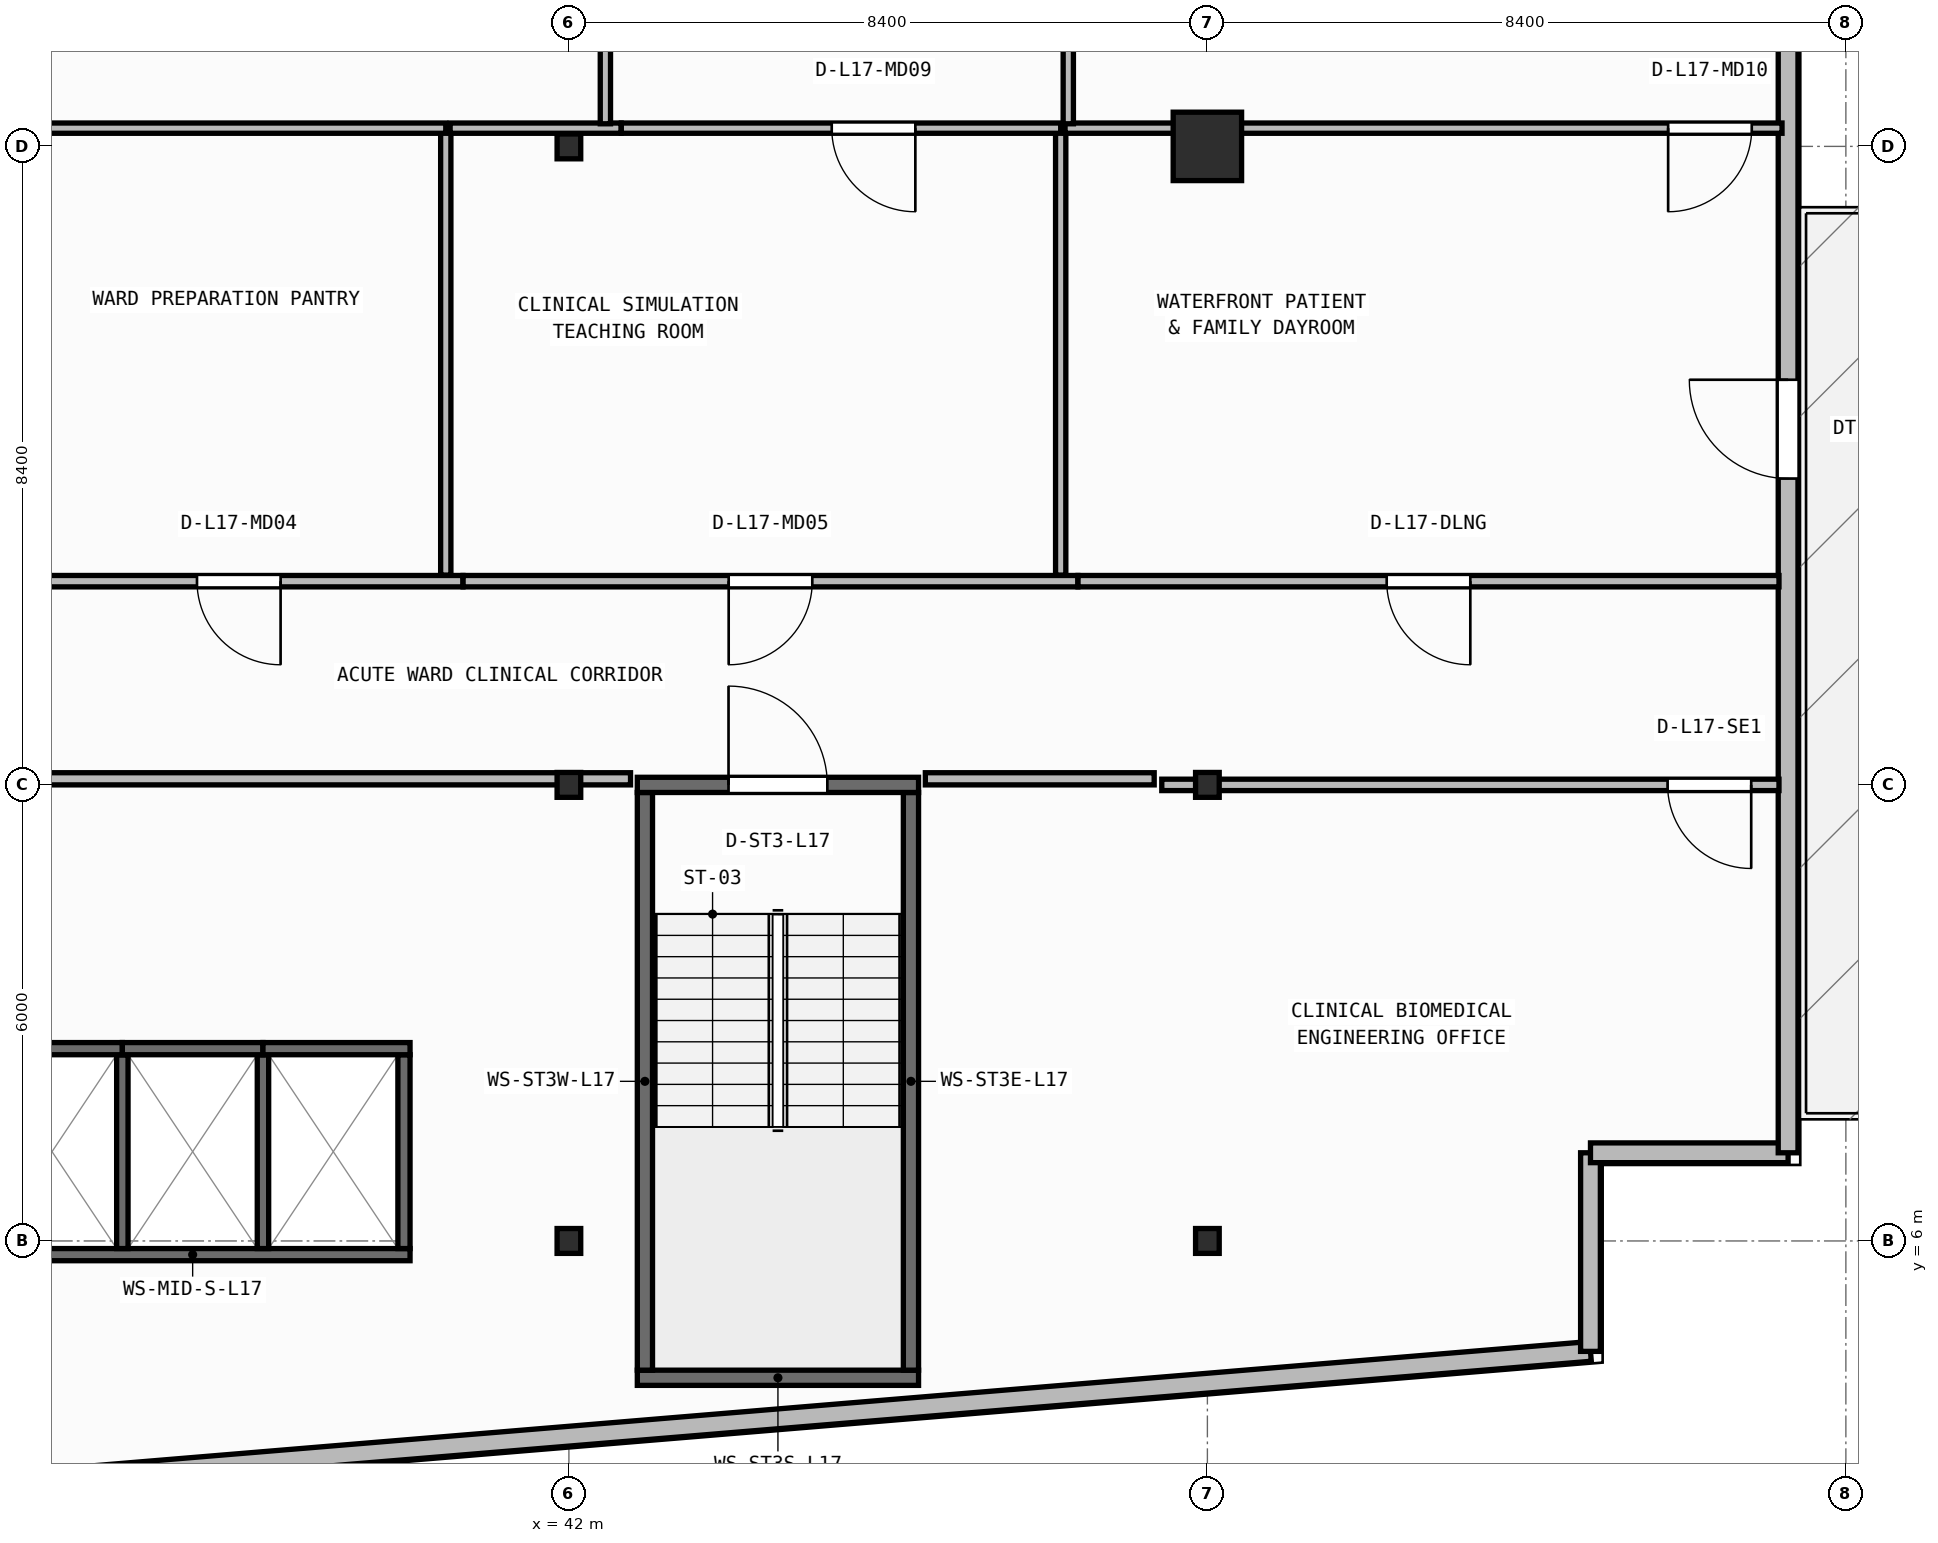
"""IFC4 building model, lengths in metres.
Left out: names, types, materials, properties, quantities, classifications, styles, units other than length and angle.
Written with IfcOpenShell. Run it as: python <this file> out.ifc"""

import sys

from ifc_helpers import new_model, si_unit, direction, frame, frame_2d, origin, origin_2d, place, context, subcontext, project, spatial, rectangle, i_section, extrude, element, fill, save


model = new_model("IFC4")
c1 = context("Model", 3, precision=1e-05, world=origin(), true_north=direction((0.0, 1.0)))
c2 = subcontext(c1, "Body", "Model", "MODEL_VIEW")
j1 = project(units=[si_unit("LENGTHUNIT", "METRE"), si_unit("PLANEANGLEUNIT", "RADIAN")], contexts=[c1])
p1 = place(None, origin())
s1 = spatial("IfcSite", under=j1, at=p1, CompositionType="ELEMENT")
p2 = place(p1, origin())
s2 = spatial("IfcBuilding", under=s1, at=p2, CompositionType="ELEMENT")
p3 = place(p2, frame((0.0, 0.0, 69.9)))
s3 = spatial("IfcBuildingStorey", under=s2, at=p3, CompositionType="ELEMENT", Elevation=69.9)
for number, where, z_axis, x_axis in (
    (1, (42.0, 6.0, 0.0), (0.0, 0.0, 1.0), (1.0, 0.0, 0.0)),
    (2, (50.4, 6.0, 0.0), (0.0, 0.0, 1.0), (1.0, 0.0, 0.0)),
    (3, (42.0, 12.0, 0.0), (0.0, 0.0, 1.0), (1.0, 0.0, 0.0)),
    (4, (50.4, 12.0, 0.0), (0.0, 0.0, 1.0), (1.0, 0.0, 0.0)),
    (5, (42.0, 20.4, 0.0), (0.0, 0.0, 1.0), (1.0, 0.0, 0.0)),
):
    element("IfcColumn", number, at=place(p3, frame(where, z_axis=z_axis, x_axis=x_axis)), inside=s3, PredefinedType="COLUMN", context=c2, shape_type="SweptSolid", body=[
        extrude(i_section(OverallWidth=0.311, OverallDepth=0.327, WebThickness=0.016, FlangeThickness=0.025, FilletRadius=0.017, at=origin_2d()), origin(), (0.0, 0.0, 1.0), 3.95),
    ])
p4 = place(p3, frame((50.4, 20.4, 0.0), z_axis=(0.0, 0.0, 1.0), x_axis=(1.0, 0.0, 0.0)))
e6 = element("IfcColumn", 6, at=p4, inside=s3, PredefinedType="COLUMN", context=c2, shape_type="SweptSolid", body=[
    extrude(rectangle(XDim=0.9, YDim=0.9, at=origin_2d()), origin(), (0.0, 0.0, 1.0), 3.95),
])
p5 = place(p3, frame((2.76, 0.174, 0.0), z_axis=(0.0, 0.0, 1.0), x_axis=(0.996571478456, 0.082736257641, 0.0)))
e7 = element("IfcWall", 7, at=p5, inside=s3, PredefinedType="STANDARD", context=c2, shape_type="SweptSolid", body=[
    extrude(rectangle(XDim=52.861, YDim=0.26, at=frame_2d((26.431, 0.0))), origin(), (0.0, 0.0, 1.0), 3.71),
])
p6 = place(p5, frame((25.231, 0.0, 0.9)))
e8 = element("IfcOpeningElement", 8, at=p6, cuts=e7, PredefinedType="OPENING", context=c2, shape_type="SweptSolid", body=[
    extrude(rectangle(XDim=2.4, YDim=1.65, at=frame_2d((1.2, 0.825))), frame((0.0, 0.14, 0.0), z_axis=(0.0, -1.0, 0.0), x_axis=(1.0, 0.0, 0.0)), (0.0, 0.0, 1.0), 0.28),
])
p7 = place(p3, frame((55.44, 4.547, 0.0), z_axis=(0.0, 0.0, 1.0), x_axis=(0.0, 1.0, 0.0)))
e9 = element("IfcWall", 9, at=p7, inside=s3, PredefinedType="STANDARD", context=c2, shape_type="SweptSolid", body=[
    extrude(rectangle(XDim=2.613, YDim=0.26, at=frame_2d((1.306, 0.0))), origin(), (0.0, 0.0, 1.0), 3.71),
])
p8 = place(p3, frame((55.44, 7.16, 0.0), z_axis=(0.0, 0.0, 1.0), x_axis=(1.0, 0.0, 0.0)))
e10 = element("IfcWall", 10, at=p8, inside=s3, PredefinedType="STANDARD", context=c2, shape_type="SweptSolid", body=[
    extrude(rectangle(XDim=2.6, YDim=0.26, at=frame_2d((1.3, 0.0))), origin(), (0.0, 0.0, 1.0), 3.71),
])
p9 = place(p3, frame((58.04, 7.16, 0.0), z_axis=(0.0, 0.0, 1.0), x_axis=(0.0, 1.0, 0.0)))
e11 = element("IfcWall", 11, at=p9, inside=s3, PredefinedType="STANDARD", context=c2, shape_type="SweptSolid", body=[
    extrude(rectangle(XDim=24.48, YDim=0.26, at=frame_2d((12.24, 0.0))), origin(), (0.0, 0.0, 1.0), 3.71),
])
p10 = place(p9, frame((8.87, 0.0, 0.0)))
e12 = element("IfcOpeningElement", 12, at=p10, cuts=e11, PredefinedType="OPENING", context=c2, shape_type="SweptSolid", body=[
    extrude(rectangle(XDim=1.3, YDim=2.15, at=frame_2d((0.65, 1.075))), frame((0.0, 0.14, 0.0), z_axis=(0.0, -1.0, 0.0), x_axis=(1.0, 0.0, 0.0)), (0.0, 0.0, 1.0), 0.28),
])
p11 = place(p3, frame((42.9, 4.2, 0.0), z_axis=(0.0, 0.0, 1.0), x_axis=(1.0, 0.0, 0.0)))
e13 = element("IfcWall", 13, at=p11, inside=s3, PredefinedType="SHEAR", context=c2, shape_type="SweptSolid", body=[
    extrude(rectangle(XDim=3.7, YDim=0.2, at=frame_2d((1.85, 0.0))), origin(), (0.0, 0.0, 1.0), 3.71),
])
for number, where, z_axis, x_axis in (
    (14, (43.0, 4.3, 0.0), (0.0, 0.0, 1.0), (0.0, 1.0, 0.0)),
    (15, (46.5, 4.3, 0.0), (0.0, 0.0, 1.0), (0.0, 1.0, 0.0)),
):
    element("IfcWall", number, at=place(p3, frame(where, z_axis=z_axis, x_axis=x_axis)), inside=s3, PredefinedType="SHEAR", context=c2, shape_type="SweptSolid", body=[
        extrude(rectangle(XDim=7.6, YDim=0.2, at=frame_2d((3.8, 0.0))), origin(), (0.0, 0.0, 1.0), 3.71),
    ])
p12 = place(p3, frame((42.9, 12.0, 0.0), z_axis=(0.0, 0.0, 1.0), x_axis=(1.0, 0.0, 0.0)))
e16 = element("IfcWall", 16, at=p12, inside=s3, PredefinedType="SHEAR", context=c2, shape_type="SweptSolid", body=[
    extrude(rectangle(XDim=3.7, YDim=0.2, at=frame_2d((1.85, 0.0))), origin(), (0.0, 0.0, 1.0), 3.71),
])
p13 = place(p12, frame((1.2, 0.0, 0.0)))
e17 = element("IfcOpeningElement", 17, at=p13, cuts=e16, PredefinedType="OPENING", context=c2, shape_type="SweptSolid", body=[
    extrude(rectangle(XDim=1.3, YDim=2.15, at=frame_2d((0.65, 1.075))), frame((0.0, 0.11, 0.0), z_axis=(0.0, -1.0, 0.0), x_axis=(1.0, 0.0, 0.0)), (0.0, 0.0, 1.0), 0.22),
])
p14 = place(p3, frame((34.19, 5.82, 0.0), z_axis=(0.0, 0.0, 1.0), x_axis=(1.0, 0.0, 0.0)))
e18 = element("IfcWall", 18, at=p14, inside=s3, PredefinedType="SHEAR", context=c2, shape_type="SweptSolid", body=[
    extrude(rectangle(XDim=5.72, YDim=0.16, at=frame_2d((2.86, 0.0))), origin(), (0.0, 0.0, 1.0), 3.71),
])
p15 = place(p3, frame((39.83, 5.9, 0.0), z_axis=(0.0, 0.0, 1.0), x_axis=(0.0, 1.0, 0.0)))
e19 = element("IfcWall", 19, at=p15, inside=s3, PredefinedType="SHEAR", context=c2, shape_type="SweptSolid", body=[
    extrude(rectangle(XDim=2.55, YDim=0.16, at=frame_2d((1.275, 0.0))), origin(), (0.0, 0.0, 1.0), 3.71),
])
for number, where, z_axis, x_axis in (
    (20, (36.125, 5.9, 0.0), (0.0, 0.0, 1.0), (0.0, 1.0, 0.0)),
    (21, (37.975, 5.9, 0.0), (0.0, 0.0, 1.0), (0.0, 1.0, 0.0)),
):
    element("IfcWall", number, at=place(p3, frame(where, z_axis=z_axis, x_axis=x_axis)), inside=s3, PredefinedType="SHEAR", context=c2, shape_type="SweptSolid", body=[
        extrude(rectangle(XDim=2.55, YDim=0.15, at=frame_2d((1.275, 0.0))), origin(), (0.0, 0.0, 1.0), 3.71),
    ])
p16 = place(p3, frame((34.19, 8.53, 0.0), z_axis=(0.0, 0.0, 1.0), x_axis=(1.0, 0.0, 0.0)))
e22 = element("IfcWall", 22, at=p16, inside=s3, PredefinedType="SHEAR", context=c2, shape_type="SweptSolid", body=[
    extrude(rectangle(XDim=1.935, YDim=0.16, at=frame_2d((0.968, 0.0))), origin(), (0.0, 0.0, 1.0), 3.71),
])
p17 = place(p3, frame((36.125, 8.53, 0.0), z_axis=(0.0, 0.0, 1.0), x_axis=(1.0, 0.0, 0.0)))
e23 = element("IfcWall", 23, at=p17, inside=s3, PredefinedType="SHEAR", context=c2, shape_type="SweptSolid", body=[
    extrude(rectangle(XDim=1.85, YDim=0.16, at=frame_2d((0.925, 0.0))), origin(), (0.0, 0.0, 1.0), 3.71),
])
p18 = place(p3, frame((37.975, 8.53, 0.0), z_axis=(0.0, 0.0, 1.0), x_axis=(1.0, 0.0, 0.0)))
e24 = element("IfcWall", 24, at=p18, inside=s3, PredefinedType="SHEAR", context=c2, shape_type="SweptSolid", body=[
    extrude(rectangle(XDim=1.935, YDim=0.16, at=frame_2d((0.967, 0.0))), origin(), (0.0, 0.0, 1.0), 3.71),
])
p19 = place(p3, frame((57.92, 12.0, 0.0), z_axis=(0.0, 0.0, 1.0), x_axis=(-1.0, 0.0, 0.0)))
e25 = element("IfcWall", 25, at=p19, inside=s3, PredefinedType="PARTITIONING", context=c2, shape_type="SweptSolid", body=[
    extrude(rectangle(XDim=8.12, YDim=0.15, at=frame_2d((4.06, 0.0))), origin(), (0.0, 0.0, 1.0), 3.073),
])
p20 = place(p19, frame((0.365, 0.0, 0.0)))
e26 = element("IfcOpeningElement", 26, at=p20, cuts=e25, PredefinedType="OPENING", context=c2, shape_type="SweptSolid", body=[
    extrude(rectangle(XDim=1.1, YDim=2.1, at=frame_2d((0.55, 1.05))), frame((0.0, 0.085, 0.0), z_axis=(0.0, -1.0, 0.0), x_axis=(1.0, 0.0, 0.0)), (0.0, 0.0, 1.0), 0.17),
])
p21 = place(p3, frame((40.606, 14.68, 0.0), z_axis=(0.0, 0.0, 1.0), x_axis=(-1.0, 0.0, 0.0)))
e27 = element("IfcWall", 27, at=p21, inside=s3, PredefinedType="PARTITIONING", context=c2, shape_type="SweptSolid", body=[
    extrude(rectangle(XDim=5.898, YDim=0.15, at=frame_2d((2.949, 0.0))), origin(), (0.0, 0.0, 1.0), 3.71),
])
p22 = place(p21, frame((2.399, 0.0, 0.0)))
e28 = element("IfcOpeningElement", 28, at=p22, cuts=e27, PredefinedType="OPENING", context=c2, shape_type="SweptSolid", body=[
    extrude(rectangle(XDim=1.1, YDim=2.1, at=frame_2d((0.55, 1.05))), frame((0.0, 0.085, 0.0), z_axis=(0.0, -1.0, 0.0), x_axis=(1.0, 0.0, 0.0)), (0.0, 0.0, 1.0), 0.17),
])
p23 = place(p3, frame((48.696, 14.68, 0.0), z_axis=(0.0, 0.0, 1.0), x_axis=(-1.0, 0.0, 0.0)))
e29 = element("IfcWall", 29, at=p23, inside=s3, PredefinedType="PARTITIONING", context=c2, shape_type="SweptSolid", body=[
    extrude(rectangle(XDim=8.088, YDim=0.15, at=frame_2d((4.044, 0.0))), origin(), (0.0, 0.0, 1.0), 3.71),
])
p24 = place(p23, frame((3.494, 0.0, 0.0)))
e30 = element("IfcOpeningElement", 30, at=p24, cuts=e29, PredefinedType="OPENING", context=c2, shape_type="SweptSolid", body=[
    extrude(rectangle(XDim=1.1, YDim=2.1, at=frame_2d((0.55, 1.05))), frame((0.0, 0.085, 0.0), z_axis=(0.0, -1.0, 0.0), x_axis=(1.0, 0.0, 0.0)), (0.0, 0.0, 1.0), 0.17),
])
p25 = place(p3, frame((57.92, 14.68, 0.0), z_axis=(0.0, 0.0, 1.0), x_axis=(-1.0, 0.0, 0.0)))
e31 = element("IfcWall", 31, at=p25, inside=s3, PredefinedType="PARTITIONING", context=c2, shape_type="SweptSolid", body=[
    extrude(rectangle(XDim=9.222, YDim=0.15, at=frame_2d((4.611, 0.0))), origin(), (0.0, 0.0, 1.0), 3.71),
])
p26 = place(p25, frame((4.061, 0.0, 0.0)))
e32 = element("IfcOpeningElement", 32, at=p26, cuts=e31, PredefinedType="OPENING", context=c2, shape_type="SweptSolid", body=[
    extrude(rectangle(XDim=1.1, YDim=2.1, at=frame_2d((0.55, 1.05))), frame((0.0, 0.085, 0.0), z_axis=(0.0, -1.0, 0.0), x_axis=(1.0, 0.0, 0.0)), (0.0, 0.0, 1.0), 0.17),
])
p27 = place(p3, frame((40.38, 14.76, 0.0), z_axis=(0.0, 0.0, 1.0), x_axis=(0.0, 1.0, 0.0)))
e33 = element("IfcWall", 33, at=p27, inside=s3, PredefinedType="PARTITIONING", context=c2, shape_type="SweptSolid", body=[
    extrude(rectangle(XDim=5.88, YDim=0.135, at=frame_2d((2.94, 0.0))), origin(), (0.0, 0.0, 1.0), 3.71),
])
p28 = place(p3, frame((40.38, 20.64, 0.0), z_axis=(0.0, 0.0, 1.0), x_axis=(-1.0, 0.0, 0.0)))
e34 = element("IfcWall", 34, at=p28, inside=s3, PredefinedType="PARTITIONING", context=c2, shape_type="SweptSolid", body=[
    extrude(rectangle(XDim=5.842, YDim=0.135, at=frame_2d((2.921, 0.0))), origin(), (0.0, 0.0, 1.0), 3.073),
])
p29 = place(p3, frame((48.47, 14.76, 0.0), z_axis=(0.0, 0.0, 1.0), x_axis=(0.0, 1.0, 0.0)))
e35 = element("IfcWall", 35, at=p29, inside=s3, PredefinedType="PARTITIONING", context=c2, shape_type="SweptSolid", body=[
    extrude(rectangle(XDim=5.88, YDim=0.135, at=frame_2d((2.94, 0.0))), origin(), (0.0, 0.0, 1.0), 3.71),
])
p30 = place(p3, frame((42.688, 20.64, 0.0), z_axis=(0.0, 0.0, 1.0), x_axis=(-1.0, 0.0, 0.0)))
e36 = element("IfcWall", 36, at=p30, inside=s3, PredefinedType="PARTITIONING", context=c2, shape_type="SweptSolid", body=[
    extrude(rectangle(XDim=2.25, YDim=0.135, at=frame_2d((1.125, 0.0))), origin(), (0.0, 0.0, 1.0), 3.073),
])
p31 = place(p3, frame((48.47, 20.64, 0.0), z_axis=(0.0, 0.0, 1.0), x_axis=(-1.0, 0.0, 0.0)))
e37 = element("IfcWall", 37, at=p31, inside=s3, PredefinedType="PARTITIONING", context=c2, shape_type="SweptSolid", body=[
    extrude(rectangle(XDim=5.781, YDim=0.135, at=frame_2d((2.89, 0.0))), origin(), (0.0, 0.0, 1.0), 3.073),
])
p32 = place(p31, frame((1.912, 0.0, 0.0)))
e38 = element("IfcOpeningElement", 38, at=p32, cuts=e37, PredefinedType="OPENING", context=c2, shape_type="SweptSolid", body=[
    extrude(rectangle(XDim=1.1, YDim=2.1, at=frame_2d((0.55, 1.05))), frame((0.0, 0.077, 0.0), z_axis=(0.0, -1.0, 0.0), x_axis=(1.0, 0.0, 0.0)), (0.0, 0.0, 1.0), 0.155),
])
p33 = place(p3, frame((57.96, 20.64, 0.0), z_axis=(0.0, 0.0, 1.0), x_axis=(-1.0, 0.0, 0.0)))
e39 = element("IfcWall", 39, at=p33, inside=s3, PredefinedType="PARTITIONING", context=c2, shape_type="SweptSolid", body=[
    extrude(rectangle(XDim=9.432, YDim=0.135, at=frame_2d((4.716, 0.0))), origin(), (0.0, 0.0, 1.0), 3.073),
])
p34 = place(p33, frame((0.398, 0.0, 0.0)))
e40 = element("IfcOpeningElement", 40, at=p34, cuts=e39, PredefinedType="OPENING", context=c2, shape_type="SweptSolid", body=[
    extrude(rectangle(XDim=1.1, YDim=2.1, at=frame_2d((0.55, 1.05))), frame((0.0, 0.077, 0.0), z_axis=(0.0, -1.0, 0.0), x_axis=(1.0, 0.0, 0.0)), (0.0, 0.0, 1.0), 0.155),
])
p35 = place(p3, frame((42.48, 20.698, 0.0), z_axis=(0.0, 0.0, 1.0), x_axis=(0.0, 1.0, 0.0)))
e41 = element("IfcWall", 41, at=p35, inside=s3, PredefinedType="PARTITIONING", context=c2, shape_type="SweptSolid", body=[
    extrude(rectangle(XDim=11.169, YDim=0.135, at=frame_2d((5.584, 0.0))), origin(), (0.0, 0.0, 1.0), 3.073),
])
p36 = place(p3, frame((48.57, 20.698, 0.0), z_axis=(0.0, 0.0, 1.0), x_axis=(0.0, 1.0, 0.0)))
e42 = element("IfcWall", 42, at=p36, inside=s3, PredefinedType="PARTITIONING", context=c2, shape_type="SweptSolid", body=[
    extrude(rectangle(XDim=12.269, YDim=0.135, at=frame_2d((6.135, 0.0))), origin(), (0.0, 0.0, 1.0), 3.71),
])
p37 = place(p3, frame((31.63, 12.08, 0.0), z_axis=(0.0, 0.0, 1.0), x_axis=(1.0, 0.0, 0.0)))
e43 = element("IfcWall", 43, at=p37, inside=s3, PredefinedType="PARTITIONING", context=c2, shape_type="SweptSolid", body=[
    extrude(rectangle(XDim=11.181, YDim=0.16, at=frame_2d((5.59, 0.0))), origin(), (0.0, 0.0, 1.0), 3.073),
])
p38 = place(p3, frame((46.689, 12.08, 0.0), z_axis=(0.0, 0.0, 1.0), x_axis=(1.0, 0.0, 0.0)))
e44 = element("IfcWall", 44, at=p38, inside=s3, PredefinedType="PARTITIONING", context=c2, shape_type="SweptSolid", body=[
    extrude(rectangle(XDim=3.011, YDim=0.16, at=frame_2d((1.505, 0.0))), origin(), (0.0, 0.0, 1.0), 3.073),
])
p39 = place(p10, origin())
e45 = element("IfcDoor", 45, at=p39, inside=s3, OperationType="SINGLE_SWING_RIGHT", PredefinedType="DOOR", context=c2, shape_type="SweptSolid", body=[
    extrude(rectangle(XDim=1.3, YDim=2.15, at=frame_2d((0.65, 1.075))), frame((0.0, 0.025, 0.0), z_axis=(0.0, -1.0, 0.0), x_axis=(1.0, 0.0, 0.0)), (0.0, 0.0, 1.0), 0.05),
])
fill(e12, e45)
p40 = place(p13, origin())
e46 = element("IfcDoor", 46, at=p40, inside=s3, OperationType="SINGLE_SWING_LEFT", PredefinedType="DOOR", context=c2, shape_type="SweptSolid", body=[
    extrude(rectangle(XDim=1.3, YDim=2.15, at=frame_2d((0.65, 1.075))), frame((0.0, 0.025, 0.0), z_axis=(0.0, -1.0, 0.0), x_axis=(1.0, 0.0, 0.0)), (0.0, 0.0, 1.0), 0.05),
])
fill(e17, e46)
p41 = place(p20, origin())
e47 = element("IfcDoor", 47, at=p41, inside=s3, OperationType="SINGLE_SWING_LEFT", PredefinedType="DOOR", context=c2, shape_type="SweptSolid", body=[
    extrude(rectangle(XDim=1.1, YDim=2.1, at=frame_2d((0.55, 1.05))), frame((0.0, 0.025, 0.0), z_axis=(0.0, -1.0, 0.0), x_axis=(1.0, 0.0, 0.0)), (0.0, 0.0, 1.0), 0.05),
])
fill(e26, e47)
p42 = place(p22, origin())
e48 = element("IfcDoor", 48, at=p42, inside=s3, OperationType="SINGLE_SWING_LEFT", PredefinedType="DOOR", context=c2, shape_type="SweptSolid", body=[
    extrude(rectangle(XDim=1.1, YDim=2.1, at=frame_2d((0.55, 1.05))), frame((0.0, 0.025, 0.0), z_axis=(0.0, -1.0, 0.0), x_axis=(1.0, 0.0, 0.0)), (0.0, 0.0, 1.0), 0.05),
])
fill(e28, e48)
p43 = place(p24, origin())
e49 = element("IfcDoor", 49, at=p43, inside=s3, OperationType="SINGLE_SWING_RIGHT", PredefinedType="DOOR", context=c2, shape_type="SweptSolid", body=[
    extrude(rectangle(XDim=1.1, YDim=2.1, at=frame_2d((0.55, 1.05))), frame((0.0, 0.025, 0.0), z_axis=(0.0, -1.0, 0.0), x_axis=(1.0, 0.0, 0.0)), (0.0, 0.0, 1.0), 0.05),
])
fill(e30, e49)
p44 = place(p26, origin())
e50 = element("IfcDoor", 50, at=p44, inside=s3, OperationType="SINGLE_SWING_LEFT", PredefinedType="DOOR", context=c2, shape_type="SweptSolid", body=[
    extrude(rectangle(XDim=1.1, YDim=2.1, at=frame_2d((0.55, 1.05))), frame((0.0, 0.025, 0.0), z_axis=(0.0, -1.0, 0.0), x_axis=(1.0, 0.0, 0.0)), (0.0, 0.0, 1.0), 0.05),
])
fill(e32, e50)
p45 = place(p32, origin())
e51 = element("IfcDoor", 51, at=p45, inside=s3, OperationType="SINGLE_SWING_LEFT", PredefinedType="DOOR", context=c2, shape_type="SweptSolid", body=[
    extrude(rectangle(XDim=1.1, YDim=2.1, at=frame_2d((0.55, 1.05))), frame((0.0, 0.025, 0.0), z_axis=(0.0, -1.0, 0.0), x_axis=(1.0, 0.0, 0.0)), (0.0, 0.0, 1.0), 0.05),
])
fill(e38, e51)
p46 = place(p34, origin())
e52 = element("IfcDoor", 52, at=p46, inside=s3, OperationType="SINGLE_SWING_RIGHT", PredefinedType="DOOR", context=c2, shape_type="SweptSolid", body=[
    extrude(rectangle(XDim=1.1, YDim=2.1, at=frame_2d((0.55, 1.05))), frame((0.0, 0.025, 0.0), z_axis=(0.0, -1.0, 0.0), x_axis=(1.0, 0.0, 0.0)), (0.0, 0.0, 1.0), 0.05),
])
fill(e40, e52)
save(model, sys.argv[1])
